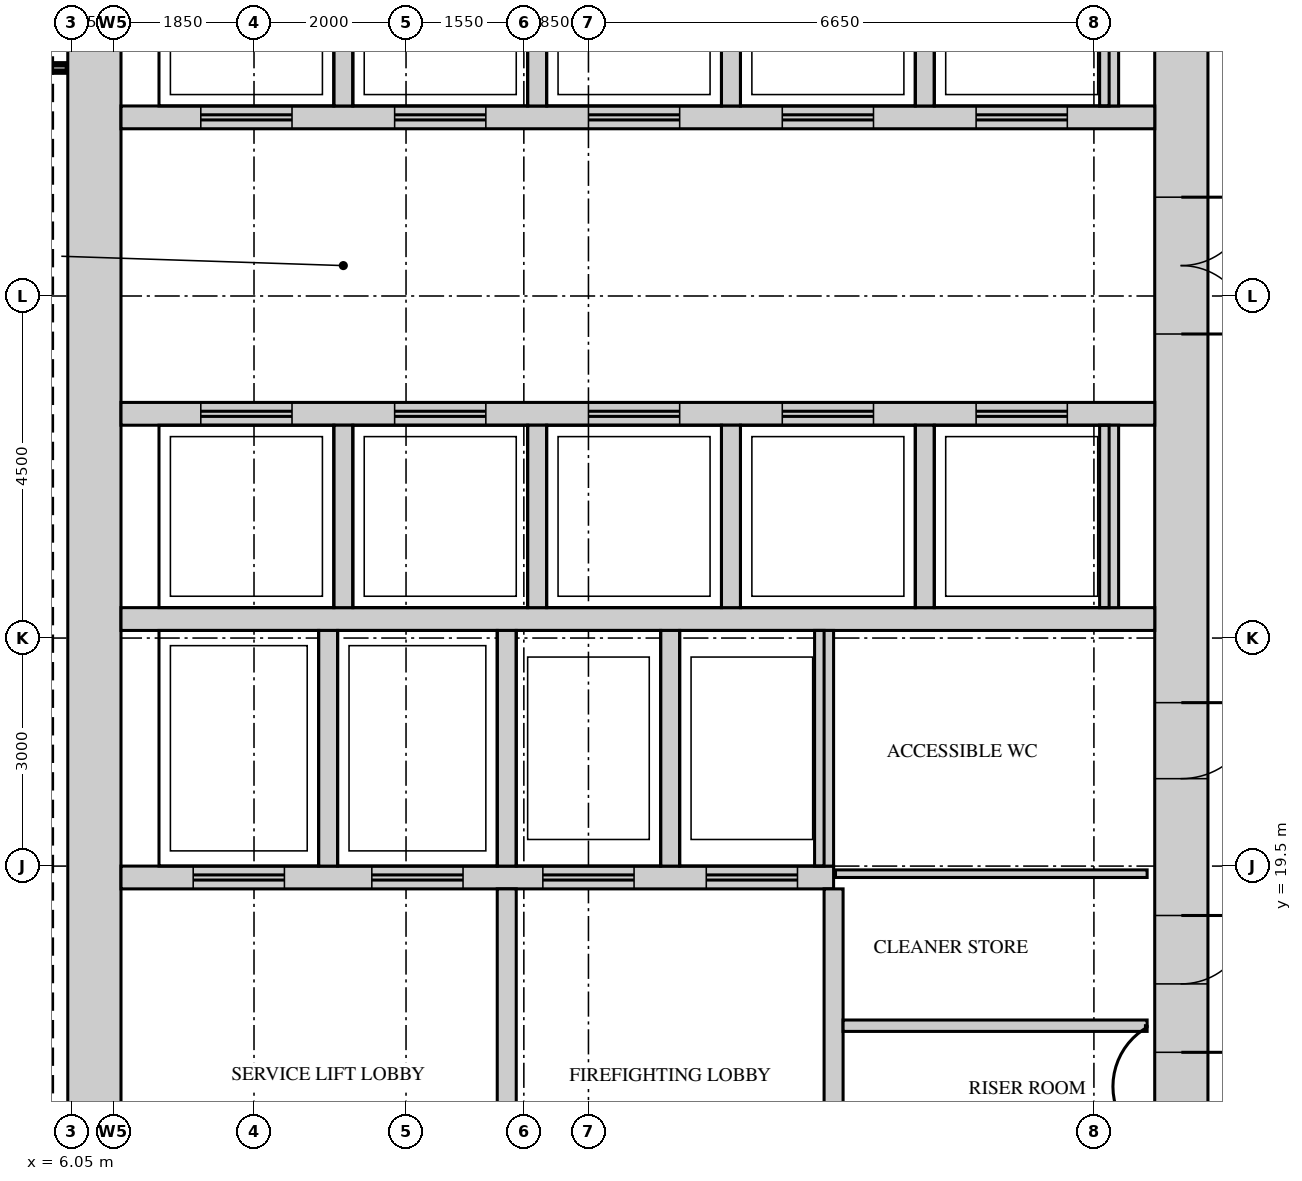
"""IFC4 building model, lengths in metres.
Left out: names, types, materials, properties, quantities, classifications, styles, units other than length and angle.
Written with IfcOpenShell. Run it as: python <this file> out.ifc"""

import sys

from ifc_helpers import new_model, si_unit, direction, frame, frame_2d, origin, place, context, subcontext, project, spatial, rectangle, extrude, source, transform, mapped, element, fill, save


model = new_model("IFC4")
c1 = context("Model", 3, precision=1e-05, world=origin(), true_north=direction((0.0, 1.0)))
c2 = subcontext(c1, "Body", "Model", "MODEL_VIEW")
j1 = project(units=[si_unit("LENGTHUNIT", "METRE"), si_unit("PLANEANGLEUNIT", "RADIAN")], contexts=[c1])
p1 = place(None, origin())
s1 = spatial("IfcSite", under=j1, at=p1, CompositionType="ELEMENT")
p2 = place(p1, origin())
s2 = spatial("IfcBuilding", under=s1, at=p2, CompositionType="ELEMENT")
p3 = place(p2, frame((0.0, 0.0, 258.2)))
s3 = spatial("IfcBuildingStorey", under=s2, at=p3, CompositionType="ELEMENT", Elevation=258.2)
m1 = source(origin(), c2, "Body", "SweptSolid", [
    extrude(rectangle(XDim=22.6, YDim=0.7, at=frame_2d((11.3, 0.0))), origin(), (0.0, 0.0, 1.0), 3.75),
])
p4 = place(p3, frame((20.65, 15.7, 0.0), z_axis=(0.0, 0.0, 1.0), x_axis=(0.0, 1.0, 0.0)))
e1 = element("IfcWall", 1, at=p4, inside=s3, PredefinedType="SHEAR", context=c2, shape_type="MappedRepresentation", body=[
    mapped(m1, transform((0.0, 0.0, 0.0))),
])
m2 = source(origin(), c2, "Body", "SweptSolid", [
    extrude(rectangle(XDim=1.8, YDim=2.1, at=frame_2d((0.9, 1.05))), frame((0.0, 0.36, 0.0), z_axis=(0.0, -1.0, 0.0), x_axis=(1.0, 0.0, 0.0)), (0.0, 0.0, 1.0), 0.72),
])
p5 = place(p4, frame((10.8, 0.0, 0.0)))
e2 = element("IfcOpeningElement", 2, at=p5, cuts=e1, PredefinedType="OPENING", context=c2, shape_type="MappedRepresentation", body=[
    mapped(m2, transform((0.0, 0.0, 0.0))),
])
m3 = source(origin(), c2, "Body", "SweptSolid", [
    extrude(rectangle(XDim=0.9, YDim=2.1, at=frame_2d((0.45, 1.05))), frame((0.0, 0.36, 0.0), z_axis=(0.0, -1.0, 0.0), x_axis=(1.0, 0.0, 0.0)), (0.0, 0.0, 1.0), 0.72),
])
p6 = place(p4, frame((0.45, 0.0, 0.0)))
e3 = element("IfcOpeningElement", 3, at=p6, cuts=e1, PredefinedType="OPENING", context=c2, shape_type="MappedRepresentation", body=[
    mapped(m3, transform((0.0, 0.0, 0.0))),
])
p7 = place(p4, frame((2.25, 0.0, 0.0)))
e4 = element("IfcOpeningElement", 4, at=p7, cuts=e1, PredefinedType="OPENING", context=c2, shape_type="MappedRepresentation", body=[
    mapped(m3, transform((0.0, 0.0, 0.0))),
])
m4 = source(origin(), c2, "Body", "SweptSolid", [
    extrude(rectangle(XDim=1.0, YDim=2.1, at=frame_2d((0.5, 1.05))), frame((0.0, 0.36, 0.0), z_axis=(0.0, -1.0, 0.0), x_axis=(1.0, 0.0, 0.0)), (0.0, 0.0, 1.0), 0.72),
])
p8 = place(p4, frame((4.95, 0.0, 0.0)))
e5 = element("IfcOpeningElement", 5, at=p8, cuts=e1, PredefinedType="OPENING", context=c2, shape_type="MappedRepresentation", body=[
    mapped(m4, transform((0.0, 0.0, 0.0))),
])
p9 = place(p3, frame((6.35, 15.7, 0.0), z_axis=(0.0, 0.0, 1.0), x_axis=(0.0, 1.0, 0.0)))
e6 = element("IfcWall", 6, at=p9, inside=s3, PredefinedType="SHEAR", context=c2, shape_type="MappedRepresentation", body=[
    mapped(m1, transform((0.0, 0.0, 0.0))),
])
m5 = source(origin(), c2, "Body", "SweptSolid", [
    extrude(rectangle(XDim=13.6, YDim=0.3, at=frame_2d((6.8, 0.0))), origin(), (0.0, 0.0, 1.0), 3.75),
])
p10 = place(p3, frame((6.7, 22.75, 0.0), z_axis=(0.0, 0.0, 1.0), x_axis=(1.0, 0.0, 0.0)))
e7 = element("IfcWall", 7, at=p10, inside=s3, PredefinedType="STANDARD", context=c2, shape_type="MappedRepresentation", body=[
    mapped(m5, transform((0.0, 0.0, 0.0))),
])
m6 = source(origin(), c2, "Body", "SweptSolid", [
    extrude(rectangle(XDim=9.375, YDim=0.3, at=frame_2d((4.688, 0.0))), origin(), (0.0, 0.0, 1.0), 3.75),
])
p11 = place(p3, frame((6.7, 19.35, 0.0), z_axis=(0.0, 0.0, 1.0), x_axis=(1.0, 0.0, 0.0)))
e8 = element("IfcWall", 8, at=p11, inside=s3, PredefinedType="STANDARD", context=c2, shape_type="MappedRepresentation", body=[
    mapped(m6, transform((0.0, 0.0, 0.0))),
])
m7 = source(origin(), c2, "Body", "SweptSolid", [
    extrude(rectangle(XDim=1.2, YDim=2.1, at=frame_2d((0.6, 1.05))), frame((0.0, 0.16, 0.0), z_axis=(0.0, -1.0, 0.0), x_axis=(1.0, 0.0, 0.0)), (0.0, 0.0, 1.0), 0.32),
])
p12 = place(p11, frame((0.95, 0.0, 0.0)))
e9 = element("IfcOpeningElement", 9, at=p12, cuts=e8, PredefinedType="OPENING", context=c2, shape_type="MappedRepresentation", body=[
    mapped(m7, transform((0.0, 0.0, 0.0))),
])
p13 = place(p11, frame((3.3, 0.0, 0.0)))
e10 = element("IfcOpeningElement", 10, at=p13, cuts=e8, PredefinedType="OPENING", context=c2, shape_type="MappedRepresentation", body=[
    mapped(m7, transform((0.0, 0.0, 0.0))),
])
p14 = place(p11, frame((5.55, 0.0, 0.0)))
e11 = element("IfcOpeningElement", 11, at=p14, cuts=e8, PredefinedType="OPENING", context=c2, shape_type="MappedRepresentation", body=[
    mapped(m7, transform((0.0, 0.0, 0.0))),
])
p15 = place(p11, frame((7.7, 0.0, 0.0)))
e12 = element("IfcOpeningElement", 12, at=p15, cuts=e8, PredefinedType="OPENING", context=c2, shape_type="MappedRepresentation", body=[
    mapped(m7, transform((0.0, 0.0, 0.0))),
])
p16 = place(p3, frame((6.7, 29.35, 0.0), z_axis=(0.0, 0.0, 1.0), x_axis=(1.0, 0.0, 0.0)))
e13 = element("IfcWall", 13, at=p16, inside=s3, PredefinedType="STANDARD", context=c2, shape_type="MappedRepresentation", body=[
    mapped(m5, transform((0.0, 0.0, 0.0))),
])
p17 = place(p16, frame((1.05, 0.0, 0.0)))
e14 = element("IfcOpeningElement", 14, at=p17, cuts=e13, PredefinedType="OPENING", context=c2, shape_type="MappedRepresentation", body=[
    mapped(m7, transform((0.0, 0.0, 0.0))),
])
p18 = place(p16, frame((3.6, 0.0, 0.0)))
e15 = element("IfcOpeningElement", 15, at=p18, cuts=e13, PredefinedType="OPENING", context=c2, shape_type="MappedRepresentation", body=[
    mapped(m7, transform((0.0, 0.0, 0.0))),
])
p19 = place(p16, frame((6.15, 0.0, 0.0)))
e16 = element("IfcOpeningElement", 16, at=p19, cuts=e13, PredefinedType="OPENING", context=c2, shape_type="MappedRepresentation", body=[
    mapped(m7, transform((0.0, 0.0, 0.0))),
])
p20 = place(p16, frame((8.7, 0.0, 0.0)))
e17 = element("IfcOpeningElement", 17, at=p20, cuts=e13, PredefinedType="OPENING", context=c2, shape_type="MappedRepresentation", body=[
    mapped(m7, transform((0.0, 0.0, 0.0))),
])
p21 = place(p16, frame((11.25, 0.0, 0.0)))
e18 = element("IfcOpeningElement", 18, at=p21, cuts=e13, PredefinedType="OPENING", context=c2, shape_type="MappedRepresentation", body=[
    mapped(m7, transform((0.0, 0.0, 0.0))),
])
p22 = place(p3, frame((6.7, 25.45, 0.0), z_axis=(0.0, 0.0, 1.0), x_axis=(1.0, 0.0, 0.0)))
e19 = element("IfcWall", 19, at=p22, inside=s3, PredefinedType="STANDARD", context=c2, shape_type="MappedRepresentation", body=[
    mapped(m5, transform((0.0, 0.0, 0.0))),
])
p23 = place(p22, frame((1.05, 0.0, 0.0)))
e20 = element("IfcOpeningElement", 20, at=p23, cuts=e19, PredefinedType="OPENING", context=c2, shape_type="MappedRepresentation", body=[
    mapped(m7, transform((0.0, 0.0, 0.0))),
])
p24 = place(p22, frame((3.6, 0.0, 0.0)))
e21 = element("IfcOpeningElement", 21, at=p24, cuts=e19, PredefinedType="OPENING", context=c2, shape_type="MappedRepresentation", body=[
    mapped(m7, transform((0.0, 0.0, 0.0))),
])
p25 = place(p22, frame((6.15, 0.0, 0.0)))
e22 = element("IfcOpeningElement", 22, at=p25, cuts=e19, PredefinedType="OPENING", context=c2, shape_type="MappedRepresentation", body=[
    mapped(m7, transform((0.0, 0.0, 0.0))),
])
p26 = place(p22, frame((8.7, 0.0, 0.0)))
e23 = element("IfcOpeningElement", 23, at=p26, cuts=e19, PredefinedType="OPENING", context=c2, shape_type="MappedRepresentation", body=[
    mapped(m7, transform((0.0, 0.0, 0.0))),
])
p27 = place(p22, frame((11.25, 0.0, 0.0)))
e24 = element("IfcOpeningElement", 24, at=p27, cuts=e19, PredefinedType="OPENING", context=c2, shape_type="MappedRepresentation", body=[
    mapped(m7, transform((0.0, 0.0, 0.0))),
])
m8 = source(origin(), c2, "Body", "SweptSolid", [
    extrude(rectangle(XDim=3.1, YDim=0.25, at=frame_2d((1.55, 0.0))), origin(), (0.0, 0.0, 1.0), 3.75),
])
for number, where, z_axis, x_axis in (
    (25, (9.425, 19.5, 0.0), (0.0, 0.0, 1.0), (0.0, 1.0, 0.0)),
    (26, (11.775, 19.5, 0.0), (0.0, 0.0, 1.0), (0.0, 1.0, 0.0)),
    (27, (13.925, 19.5, 0.0), (0.0, 0.0, 1.0), (0.0, 1.0, 0.0)),
    (28, (15.95, 19.5, 0.0), (0.0, 0.0, 1.0), (0.0, 1.0, 0.0)),
):
    element("IfcWall", number, at=place(p3, frame(where, z_axis=z_axis, x_axis=x_axis)), inside=s3, PredefinedType="STANDARD", context=c2, shape_type="MappedRepresentation", body=[
        mapped(m8, transform((0.0, 0.0, 0.0))),
    ])
m9 = source(origin(), c2, "Body", "SweptSolid", [
    extrude(rectangle(XDim=2.4, YDim=0.25, at=frame_2d((1.2, 0.0))), origin(), (0.0, 0.0, 1.0), 3.75),
])
for number, where, z_axis, x_axis in (
    (29, (17.275, 29.5, 0.0), (0.0, 0.0, 1.0), (0.0, 1.0, 0.0)),
    (30, (19.7, 29.5, 0.0), (0.0, 0.0, 1.0), (0.0, 1.0, 0.0)),
    (31, (9.625, 29.5, 0.0), (0.0, 0.0, 1.0), (0.0, 1.0, 0.0)),
    (32, (12.175, 29.5, 0.0), (0.0, 0.0, 1.0), (0.0, 1.0, 0.0)),
    (33, (14.725, 29.5, 0.0), (0.0, 0.0, 1.0), (0.0, 1.0, 0.0)),
):
    element("IfcWall", number, at=place(p3, frame(where, z_axis=z_axis, x_axis=x_axis)), inside=s3, PredefinedType="STANDARD", context=c2, shape_type="MappedRepresentation", body=[
        mapped(m9, transform((0.0, 0.0, 0.0))),
    ])
m10 = source(origin(), c2, "Body", "SweptSolid", [
    extrude(rectangle(XDim=2.4, YDim=0.25, at=frame_2d((1.2, 0.0))), origin(), (0.0, 0.0, 1.0), 3.75),
])
for number, where, z_axis, x_axis in (
    (34, (17.275, 22.9, 0.0), (0.0, 0.0, 1.0), (0.0, 1.0, 0.0)),
    (35, (19.7, 22.9, 0.0), (0.0, 0.0, 1.0), (0.0, 1.0, 0.0)),
    (36, (9.625, 22.9, 0.0), (0.0, 0.0, 1.0), (0.0, 1.0, 0.0)),
    (37, (12.175, 22.9, 0.0), (0.0, 0.0, 1.0), (0.0, 1.0, 0.0)),
    (38, (14.725, 22.9, 0.0), (0.0, 0.0, 1.0), (0.0, 1.0, 0.0)),
):
    element("IfcWall", number, at=place(p3, frame(where, z_axis=z_axis, x_axis=x_axis)), inside=s3, PredefinedType="STANDARD", context=c2, shape_type="MappedRepresentation", body=[
        mapped(m10, transform((0.0, 0.0, 0.0))),
    ])
m11 = source(origin(), c2, "Body", "SweptSolid", [
    extrude(rectangle(XDim=3.5, YDim=0.25, at=frame_2d((1.75, 0.0))), origin(), (0.0, 0.0, 1.0), 3.75),
])
for number, where, z_axis, x_axis in (
    (39, (16.075, 15.7, 0.0), (0.0, 0.0, 1.0), (0.0, 1.0, 0.0)),
    (40, (11.775, 15.7, 0.0), (0.0, 0.0, 1.0), (0.0, 1.0, 0.0)),
):
    element("IfcWall", number, at=place(p3, frame(where, z_axis=z_axis, x_axis=x_axis)), inside=s3, PredefinedType="STANDARD", context=c2, shape_type="MappedRepresentation", body=[
        mapped(m11, transform((0.0, 0.0, 0.0))),
    ])
m12 = source(origin(), c2, "Body", "SweptSolid", [
    extrude(rectangle(XDim=4.0, YDim=0.15, at=frame_2d((2.0, 0.0))), origin(), (0.0, 0.0, 1.0), 3.8),
])
p28 = place(p3, frame((16.2, 17.4, 0.0), z_axis=(0.0, 0.0, 1.0), x_axis=(1.0, 0.0, 0.0)))
e41 = element("IfcWall", 41, at=p28, inside=s3, PredefinedType="PARTITIONING", context=c2, shape_type="MappedRepresentation", body=[
    mapped(m12, transform((0.0, 0.0, 0.0))),
])
m13 = source(origin(), c2, "Body", "SweptSolid", [
    extrude(rectangle(XDim=4.1, YDim=0.1, at=frame_2d((2.05, 0.0))), origin(), (0.0, 0.0, 1.0), 3.8),
])
p29 = place(p3, frame((16.1, 19.4, 0.0), z_axis=(0.0, 0.0, 1.0), x_axis=(1.0, 0.0, 0.0)))
e42 = element("IfcWall", 42, at=p29, inside=s3, PredefinedType="PARTITIONING", context=c2, shape_type="MappedRepresentation", body=[
    mapped(m13, transform((0.0, 0.0, 0.0))),
])
m14 = source(origin(), c2, "Body", "SweptSolid", [
    extrude(rectangle(XDim=1.35, YDim=0.1, at=frame_2d((0.675, 0.0))), origin(), (0.0, 0.0, 1.0), 3.8),
])
p30 = place(p3, frame((4.65, 30.0, 0.0), z_axis=(0.0, 0.0, 1.0), x_axis=(1.0, 0.0, 0.0)))
e43 = element("IfcWall", 43, at=p30, inside=s3, PredefinedType="PARTITIONING", context=c2, shape_type="MappedRepresentation", body=[
    mapped(m14, transform((0.0, 0.0, 0.0))),
])
m15 = source(origin(), c2, "Body", "SweptSolid", [
    extrude(rectangle(XDim=1.8, YDim=2.1, at=frame_2d((0.9, 1.05))), frame((0.0, 0.3, 0.0), z_axis=(0.0, -1.0, 0.0), x_axis=(1.0, 0.0, 0.0)), (0.0, 0.0, 1.0), 0.6),
])
p31 = place(p5, origin())
e44 = element("IfcDoor", 44, at=p31, inside=s3, OperationType="DOUBLE_DOOR_SINGLE_SWING", PredefinedType="DOOR", context=c2, shape_type="MappedRepresentation", body=[
    mapped(m15, transform((0.0, 0.0, 0.0))),
])
fill(e2, e44)
m16 = source(origin(), c2, "Body", "SweptSolid", [
    extrude(rectangle(XDim=0.9, YDim=2.1, at=frame_2d((0.45, 1.05))), frame((0.0, 0.3, 0.0), z_axis=(0.0, -1.0, 0.0), x_axis=(1.0, 0.0, 0.0)), (0.0, 0.0, 1.0), 0.6),
])
p32 = place(p6, origin())
e45 = element("IfcDoor", 45, at=p32, inside=s3, OperationType="SINGLE_SWING_RIGHT", PredefinedType="DOOR", context=c2, shape_type="MappedRepresentation", body=[
    mapped(m16, transform((0.0, 0.0, 0.0))),
])
fill(e3, e45)
p33 = place(p7, origin())
e46 = element("IfcDoor", 46, at=p33, inside=s3, OperationType="SINGLE_SWING_RIGHT", PredefinedType="DOOR", context=c2, shape_type="MappedRepresentation", body=[
    mapped(m16, transform((0.0, 0.0, 0.0))),
])
fill(e4, e46)
m17 = source(origin(), c2, "Body", "SweptSolid", [
    extrude(rectangle(XDim=1.0, YDim=2.1, at=frame_2d((0.5, 1.05))), frame((0.0, 0.3, 0.0), z_axis=(0.0, -1.0, 0.0), x_axis=(1.0, 0.0, 0.0)), (0.0, 0.0, 1.0), 0.6),
])
p34 = place(p8, origin())
e47 = element("IfcDoor", 47, at=p34, inside=s3, OperationType="SINGLE_SWING_RIGHT", PredefinedType="DOOR", context=c2, shape_type="MappedRepresentation", body=[
    mapped(m17, transform((0.0, 0.0, 0.0))),
])
fill(e5, e47)
m18 = source(origin(), c2, "Body", "SweptSolid", [
    extrude(rectangle(XDim=1.2, YDim=2.1, at=frame_2d((0.6, 1.05))), frame((0.0, 0.025, 0.0), z_axis=(0.0, -1.0, 0.0), x_axis=(1.0, 0.0, 0.0)), (0.0, 0.0, 1.0), 0.05),
])
p35 = place(p23, origin())
e48 = element("IfcDoor", 48, at=p35, inside=s3, OperationType="DOUBLE_DOOR_SLIDING", PredefinedType="DOOR", context=c2, shape_type="MappedRepresentation", body=[
    mapped(m18, transform((0.0, 0.0, 0.0))),
])
fill(e20, e48)
p36 = place(p24, origin())
e49 = element("IfcDoor", 49, at=p36, inside=s3, OperationType="DOUBLE_DOOR_SLIDING", PredefinedType="DOOR", context=c2, shape_type="MappedRepresentation", body=[
    mapped(m18, transform((0.0, 0.0, 0.0))),
])
fill(e21, e49)
p37 = place(p25, origin())
e50 = element("IfcDoor", 50, at=p37, inside=s3, OperationType="DOUBLE_DOOR_SLIDING", PredefinedType="DOOR", context=c2, shape_type="MappedRepresentation", body=[
    mapped(m18, transform((0.0, 0.0, 0.0))),
])
fill(e22, e50)
p38 = place(p26, origin())
e51 = element("IfcDoor", 51, at=p38, inside=s3, OperationType="DOUBLE_DOOR_SLIDING", PredefinedType="DOOR", context=c2, shape_type="MappedRepresentation", body=[
    mapped(m18, transform((0.0, 0.0, 0.0))),
])
fill(e23, e51)
p39 = place(p27, origin())
e52 = element("IfcDoor", 52, at=p39, inside=s3, OperationType="DOUBLE_DOOR_SLIDING", PredefinedType="DOOR", context=c2, shape_type="MappedRepresentation", body=[
    mapped(m18, transform((0.0, 0.0, 0.0))),
])
fill(e24, e52)
p40 = place(p17, origin())
e53 = element("IfcDoor", 53, at=p40, inside=s3, OperationType="DOUBLE_DOOR_SLIDING", PredefinedType="DOOR", context=c2, shape_type="MappedRepresentation", body=[
    mapped(m18, transform((0.0, 0.0, 0.0))),
])
fill(e14, e53)
p41 = place(p18, origin())
e54 = element("IfcDoor", 54, at=p41, inside=s3, OperationType="DOUBLE_DOOR_SLIDING", PredefinedType="DOOR", context=c2, shape_type="MappedRepresentation", body=[
    mapped(m18, transform((0.0, 0.0, 0.0))),
])
fill(e15, e54)
p42 = place(p19, origin())
e55 = element("IfcDoor", 55, at=p42, inside=s3, OperationType="DOUBLE_DOOR_SLIDING", PredefinedType="DOOR", context=c2, shape_type="MappedRepresentation", body=[
    mapped(m18, transform((0.0, 0.0, 0.0))),
])
fill(e16, e55)
p43 = place(p20, origin())
e56 = element("IfcDoor", 56, at=p43, inside=s3, OperationType="DOUBLE_DOOR_SLIDING", PredefinedType="DOOR", context=c2, shape_type="MappedRepresentation", body=[
    mapped(m18, transform((0.0, 0.0, 0.0))),
])
fill(e17, e56)
p44 = place(p21, origin())
e57 = element("IfcDoor", 57, at=p44, inside=s3, OperationType="DOUBLE_DOOR_SLIDING", PredefinedType="DOOR", context=c2, shape_type="MappedRepresentation", body=[
    mapped(m18, transform((0.0, 0.0, 0.0))),
])
fill(e18, e57)
p45 = place(p12, origin())
e58 = element("IfcDoor", 58, at=p45, inside=s3, OperationType="DOUBLE_DOOR_SLIDING", PredefinedType="DOOR", context=c2, shape_type="MappedRepresentation", body=[
    mapped(m18, transform((0.0, 0.0, 0.0))),
])
fill(e9, e58)
p46 = place(p13, origin())
e59 = element("IfcDoor", 59, at=p46, inside=s3, OperationType="DOUBLE_DOOR_SLIDING", PredefinedType="DOOR", context=c2, shape_type="MappedRepresentation", body=[
    mapped(m18, transform((0.0, 0.0, 0.0))),
])
fill(e10, e59)
p47 = place(p14, origin())
e60 = element("IfcDoor", 60, at=p47, inside=s3, OperationType="DOUBLE_DOOR_SLIDING", PredefinedType="DOOR", context=c2, shape_type="MappedRepresentation", body=[
    mapped(m18, transform((0.0, 0.0, 0.0))),
])
fill(e11, e60)
p48 = place(p15, origin())
e61 = element("IfcDoor", 61, at=p48, inside=s3, OperationType="DOUBLE_DOOR_SLIDING", PredefinedType="DOOR", context=c2, shape_type="MappedRepresentation", body=[
    mapped(m18, transform((0.0, 0.0, 0.0))),
])
fill(e12, e61)
save(model, sys.argv[1])
